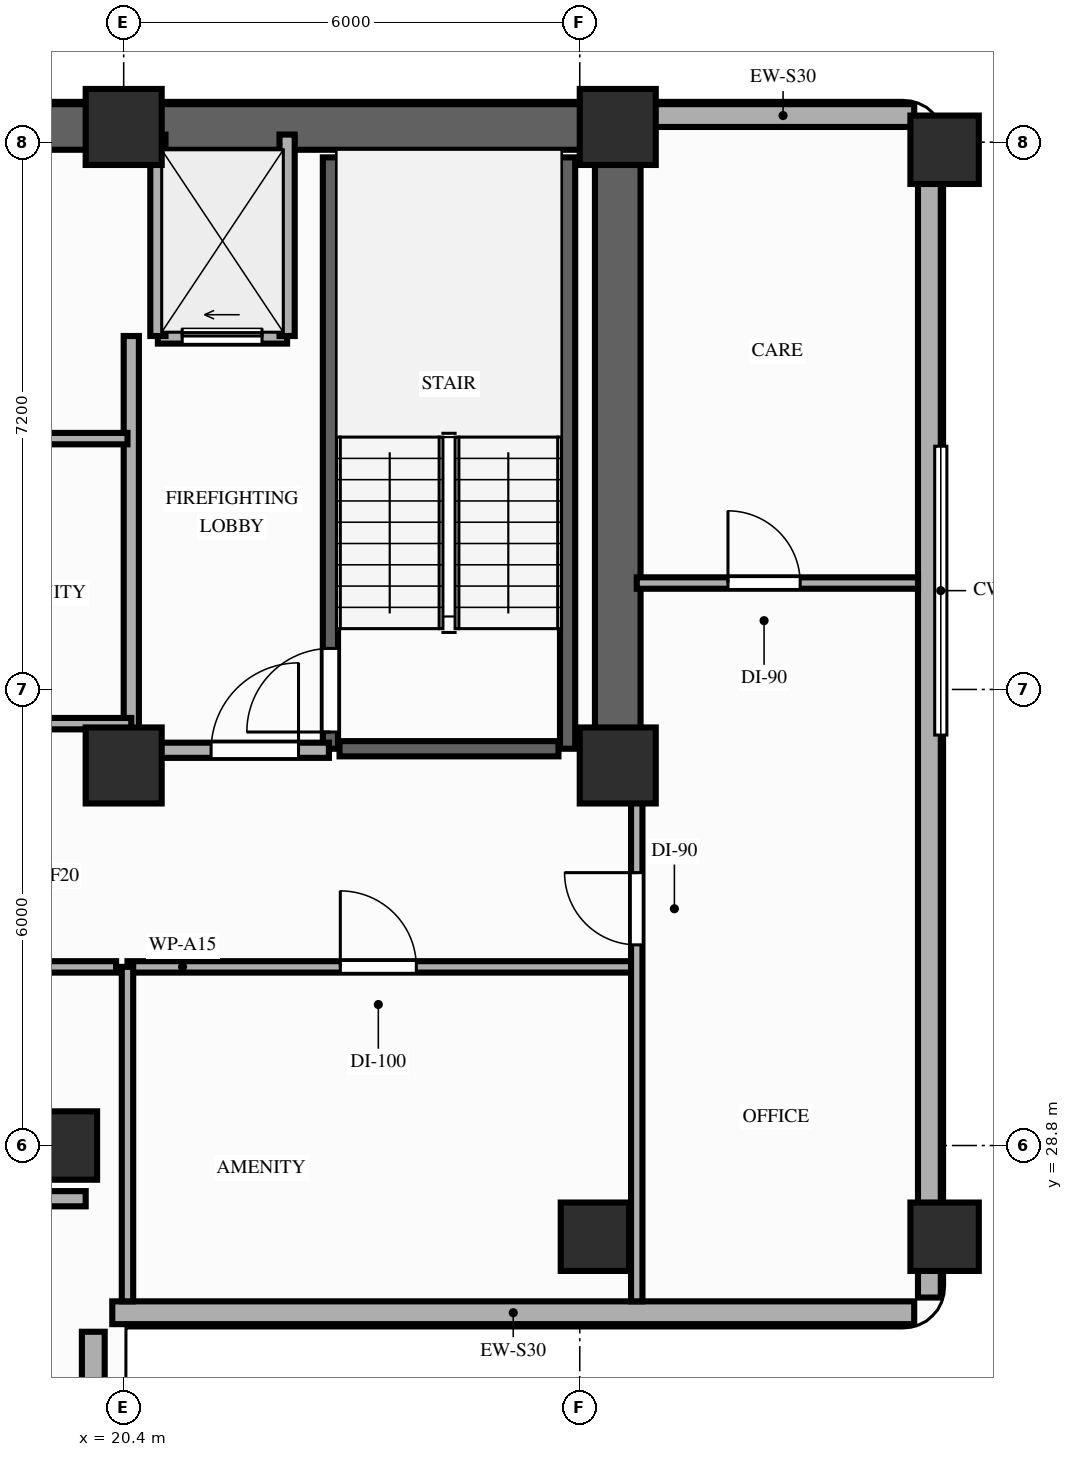
"""IFC4 building model, lengths in metres.
Left out: names, types, materials, properties, quantities, classifications, styles, units other than length and angle.
Written with IfcOpenShell. Run it as: python <this file> out.ifc"""

import sys

from ifc_helpers import new_model, si_unit, direction, frame, frame_2d, origin, origin_2d, place, context, subcontext, project, spatial, rectangle, extrude, element, fill, save


model = new_model("IFC4")
c1 = context("Model", 3, precision=1e-05, world=origin(), true_north=direction((0.0, 1.0)))
c2 = subcontext(c1, "Body", "Model", "MODEL_VIEW")
j1 = project(units=[si_unit("LENGTHUNIT", "METRE"), si_unit("PLANEANGLEUNIT", "RADIAN")], contexts=[c1])
p1 = place(None, origin())
s1 = spatial("IfcSite", under=j1, at=p1, CompositionType="ELEMENT")
p2 = place(p1, origin())
s2 = spatial("IfcBuilding", under=s1, at=p2, CompositionType="ELEMENT")
p3 = place(p2, frame((0.0, 0.0, 163.2)))
s3 = spatial("IfcBuildingStorey", under=s2, at=p3, CompositionType="ELEMENT", Elevation=163.2)
for number, where, z_axis, x_axis in (
    (1, (20.4, 33.8, 0.0), (0.0, 0.0, 1.0), (1.0, 0.0, 0.0)),
    (2, (26.9, 33.8, 0.0), (0.0, 0.0, 1.0), (1.0, 0.0, 0.0)),
    (3, (20.4, 42.2, 0.0), (0.0, 0.0, 1.0), (1.0, 0.0, 0.0)),
    (4, (26.9, 42.2, 0.0), (0.0, 0.0, 1.0), (1.0, 0.0, 0.0)),
):
    element("IfcColumn", number, at=place(p3, frame(where, z_axis=z_axis, x_axis=x_axis)), inside=s3, PredefinedType="COLUMN", context=c2, shape_type="SweptSolid", body=[
        extrude(rectangle(XDim=1.0, YDim=1.0, at=origin_2d()), origin(), (0.0, 0.0, 1.0), 3.2),
    ])
for number, where, z_axis, x_axis in (
    (5, (19.6, 28.8, 0.0), (0.0, 0.0, 1.0), (1.0, 0.0, 0.0)),
    (6, (26.6, 27.6, 0.0), (0.0, 0.0, 1.0), (1.0, 0.0, 0.0)),
    (7, (31.2, 27.6, 0.0), (0.0, 0.0, 1.0), (1.0, 0.0, 0.0)),
    (8, (31.2, 41.9, 0.0), (0.0, 0.0, 1.0), (1.0, 0.0, 0.0)),
):
    element("IfcColumn", number, at=place(p3, frame(where, z_axis=z_axis, x_axis=x_axis)), inside=s3, PredefinedType="COLUMN", context=c2, shape_type="SweptSolid", body=[
        extrude(rectangle(XDim=0.9, YDim=0.9, at=origin_2d()), origin(), (0.0, 0.0, 1.0), 3.2),
    ])
p4 = place(p3, frame((20.0, 8.8, 0.0), z_axis=(0.0, 0.0, 1.0), x_axis=(0.0, 1.0, 0.0)))
e9 = element("IfcWall", 9, at=p4, inside=s3, PredefinedType="STANDARD", context=c2, shape_type="SweptSolid", body=[
    extrude(rectangle(XDim=17.55, YDim=0.3, at=frame_2d((8.775, 0.0))), origin(), (0.0, 0.0, 1.0), 2.45),
])
p5 = place(p4, frame((1.84, 0.0, 0.85)))
e10 = element("IfcOpeningElement", 10, at=p5, cuts=e9, PredefinedType="OPENING", context=c2, shape_type="SweptSolid", body=[
    extrude(rectangle(XDim=1.1, YDim=1.35, at=frame_2d((0.55, 0.675))), frame((0.0, 0.16, 0.0), z_axis=(0.0, -1.0, 0.0), x_axis=(1.0, 0.0, 0.0)), (0.0, 0.0, 1.0), 0.32),
])
p6 = place(p4, frame((10.85, 0.0, 0.85)))
e11 = element("IfcOpeningElement", 11, at=p6, cuts=e9, PredefinedType="OPENING", context=c2, shape_type="SweptSolid", body=[
    extrude(rectangle(XDim=2.1, YDim=1.35, at=frame_2d((1.05, 0.675))), frame((0.0, 0.16, 0.0), z_axis=(0.0, -1.0, 0.0), x_axis=(1.0, 0.0, 0.0)), (0.0, 0.0, 1.0), 0.32),
])
p7 = place(p3, frame((30.8, 42.35, 0.0), z_axis=(0.0, 0.0, 1.0), x_axis=(-1.0, 0.0, 0.0)))
e12 = element("IfcWall", 12, at=p7, inside=s3, PredefinedType="STANDARD", context=c2, shape_type="SweptSolid", body=[
    extrude(rectangle(XDim=3.45, YDim=0.3, at=frame_2d((1.725, 0.0))), origin(), (0.0, 0.0, 1.0), 2.45),
])
p8 = place(p3, frame((20.25, 26.6, 0.0), z_axis=(0.0, 0.0, 1.0), x_axis=(1.0, 0.0, 0.0)))
e13 = element("IfcWall", 13, at=p8, inside=s3, PredefinedType="STANDARD", context=c2, shape_type="SweptSolid", body=[
    extrude(rectangle(XDim=10.55, YDim=0.3, at=frame_2d((5.275, 0.0))), origin(), (0.0, 0.0, 1.0), 3.02),
])
p9 = place(p3, frame((31.0, 26.8, 0.0), z_axis=(0.0, 0.0, 1.0), x_axis=(0.0, 1.0, 0.0)))
e14 = element("IfcWall", 14, at=p9, inside=s3, PredefinedType="STANDARD", context=c2, shape_type="SweptSolid", body=[
    extrude(rectangle(XDim=15.35, YDim=0.3, at=frame_2d((7.675, 0.0))), origin(), (0.0, 0.0, 1.0), 2.45),
])
p10 = place(p3, frame((6.45, 42.2, 0.0), z_axis=(0.0, 0.0, 1.0), x_axis=(1.0, 0.0, 0.0)))
e15 = element("IfcWall", 15, at=p10, inside=s3, PredefinedType="SHEAR", context=c2, shape_type="SweptSolid", body=[
    extrude(rectangle(XDim=20.45, YDim=0.6, at=frame_2d((10.225, 0.0))), origin(), (0.0, 0.0, 1.0), 3.02),
])
p11 = place(p3, frame((26.9, 33.8, 0.0), z_axis=(0.0, 0.0, 1.0), x_axis=(0.0, 1.0, 0.0)))
e16 = element("IfcWall", 16, at=p11, inside=s3, PredefinedType="SHEAR", context=c2, shape_type="SweptSolid", body=[
    extrude(rectangle(XDim=7.95, YDim=0.6, at=frame_2d((3.975, 0.0))), origin(), (0.0, 0.0, 1.0), 3.02),
])
p12 = place(p3, frame((23.12, 34.02, 0.0), z_axis=(0.0, 0.0, 1.0), x_axis=(0.0, 1.0, 0.0)))
e17 = element("IfcWall", 17, at=p12, inside=s3, PredefinedType="SHEAR", context=c2, shape_type="SweptSolid", body=[
    extrude(rectangle(XDim=7.78, YDim=0.2, at=frame_2d((3.89, 0.0))), origin(), (0.0, 0.0, 1.0), 3.02),
])
p13 = place(p12, frame((0.22, 0.0, 0.0)))
e18 = element("IfcOpeningElement", 18, at=p13, cuts=e17, PredefinedType="OPENING", context=c2, shape_type="SweptSolid", body=[
    extrude(rectangle(XDim=1.1, YDim=2.15, at=frame_2d((0.55, 1.075))), frame((0.0, 0.11, 0.0), z_axis=(0.0, -1.0, 0.0), x_axis=(1.0, 0.0, 0.0)), (0.0, 0.0, 1.0), 0.22),
])
p14 = place(p3, frame((26.24, 34.02, 0.0), z_axis=(0.0, 0.0, 1.0), x_axis=(0.0, 1.0, 0.0)))
e19 = element("IfcWall", 19, at=p14, inside=s3, PredefinedType="SHEAR", context=c2, shape_type="SweptSolid", body=[
    extrude(rectangle(XDim=7.78, YDim=0.2, at=frame_2d((3.89, 0.0))), origin(), (0.0, 0.0, 1.0), 3.02),
])
p15 = place(p3, frame((23.24, 34.02, 0.0), z_axis=(0.0, 0.0, 1.0), x_axis=(1.0, 0.0, 0.0)))
e20 = element("IfcWall", 20, at=p15, inside=s3, PredefinedType="SHEAR", context=c2, shape_type="SweptSolid", body=[
    extrude(rectangle(XDim=2.88, YDim=0.2, at=frame_2d((1.44, 0.0))), origin(), (0.0, 0.0, 1.0), 3.02),
])
p16 = place(p3, frame((20.85, 39.45, 0.0), z_axis=(0.0, 0.0, 1.0), x_axis=(1.0, 0.0, 0.0)))
e21 = element("IfcWall", 21, at=p16, inside=s3, PredefinedType="MOVABLE", context=c2, shape_type="SweptSolid", body=[
    extrude(rectangle(XDim=1.7, YDim=0.2, at=frame_2d((0.85, 0.0))), origin(), (0.0, 0.0, 1.0), 3.02),
])
p17 = place(p16, frame((0.32, 0.0, 0.0)))
e22 = element("IfcOpeningElement", 22, at=p17, cuts=e21, PredefinedType="OPENING", context=c2, shape_type="SweptSolid", body=[
    extrude(rectangle(XDim=1.05, YDim=2.15, at=frame_2d((0.525, 1.075))), frame((0.0, 0.11, 0.0), z_axis=(0.0, -1.0, 0.0), x_axis=(1.0, 0.0, 0.0)), (0.0, 0.0, 1.0), 0.22),
])
for number, where, z_axis, x_axis in (
    (23, (20.85, 39.45, 0.0), (0.0, 0.0, 1.0), (0.0, 1.0, 0.0)),
    (24, (22.55, 39.45, 0.0), (0.0, 0.0, 1.0), (0.0, 1.0, 0.0)),
):
    element("IfcWall", number, at=place(p3, frame(where, z_axis=z_axis, x_axis=x_axis)), inside=s3, PredefinedType="MOVABLE", context=c2, shape_type="SweptSolid", body=[
        extrude(rectangle(XDim=2.65, YDim=0.2, at=frame_2d((1.325, 0.0))), origin(), (0.0, 0.0, 1.0), 2.45),
    ])
p18 = place(p3, frame((20.5, 34.0, 0.0), z_axis=(0.0, 0.0, 1.0), x_axis=(0.0, 1.0, 0.0)))
e25 = element("IfcWall", 25, at=p18, inside=s3, PredefinedType="PARTITIONING", context=c2, shape_type="SweptSolid", body=[
    extrude(rectangle(XDim=5.45, YDim=0.2, at=frame_2d((2.725, 0.0))), origin(), (0.0, 0.0, 1.0), 2.45),
])
p19 = place(p3, frame((20.5, 34.0, 0.0), z_axis=(0.0, 0.0, 1.0), x_axis=(1.0, 0.0, 0.0)))
e26 = element("IfcWall", 26, at=p19, inside=s3, PredefinedType="PARTITIONING", context=c2, shape_type="SweptSolid", body=[
    extrude(rectangle(XDim=2.6, YDim=0.2, at=frame_2d((1.3, 0.0))), origin(), (0.0, 0.0, 1.0), 2.45),
])
p20 = place(p19, frame((1.05, 0.0, 0.0)))
e27 = element("IfcOpeningElement", 27, at=p20, cuts=e26, PredefinedType="OPENING", context=c2, shape_type="SweptSolid", body=[
    extrude(rectangle(XDim=1.15, YDim=2.15, at=frame_2d((0.575, 1.075))), frame((0.0, 0.11, 0.0), z_axis=(0.0, -1.0, 0.0), x_axis=(1.0, 0.0, 0.0)), (0.0, 0.0, 1.0), 0.22),
])
p21 = place(p3, frame((12.9, 34.35, 0.0), z_axis=(0.0, 0.0, 1.0), x_axis=(1.0, 0.0, 0.0)))
e28 = element("IfcWall", 28, at=p21, inside=s3, PredefinedType="PARTITIONING", context=c2, shape_type="SweptSolid", body=[
    extrude(rectangle(XDim=7.6, YDim=0.15, at=frame_2d((3.8, 0.0))), origin(), (0.0, 0.0, 1.0), 3.02),
])
p22 = place(p21, frame((2.05, 0.0, 0.0)))
e29 = element("IfcOpeningElement", 29, at=p22, cuts=e28, PredefinedType="OPENING", context=c2, shape_type="SweptSolid", body=[
    extrude(rectangle(XDim=0.85, YDim=2.05, at=frame_2d((0.425, 1.025))), frame((0.0, 0.085, 0.0), z_axis=(0.0, -1.0, 0.0), x_axis=(1.0, 0.0, 0.0)), (0.0, 0.0, 1.0), 0.17),
])
p23 = place(p21, frame((4.2, 0.0, 0.0)))
e30 = element("IfcOpeningElement", 30, at=p23, cuts=e28, PredefinedType="OPENING", context=c2, shape_type="SweptSolid", body=[
    extrude(rectangle(XDim=0.95, YDim=2.15, at=frame_2d((0.475, 1.075))), frame((0.0, 0.085, 0.0), z_axis=(0.0, -1.0, 0.0), x_axis=(1.0, 0.0, 0.0)), (0.0, 0.0, 1.0), 0.17),
])
p24 = place(p3, frame((16.4, 38.1, 0.0), z_axis=(0.0, 0.0, 1.0), x_axis=(1.0, 0.0, 0.0)))
e31 = element("IfcWall", 31, at=p24, inside=s3, PredefinedType="PARTITIONING", context=c2, shape_type="SweptSolid", body=[
    extrude(rectangle(XDim=4.05, YDim=0.15, at=frame_2d((2.025, 0.0))), origin(), (0.0, 0.0, 1.0), 3.02),
])
p25 = place(p24, frame((1.6, 0.0, 0.0)))
e32 = element("IfcOpeningElement", 32, at=p25, cuts=e31, PredefinedType="OPENING", context=c2, shape_type="SweptSolid", body=[
    extrude(rectangle(XDim=0.85, YDim=2.05, at=frame_2d((0.425, 1.025))), frame((0.0, 0.085, 0.0), z_axis=(0.0, -1.0, 0.0), x_axis=(1.0, 0.0, 0.0)), (0.0, 0.0, 1.0), 0.17),
])
p26 = place(p3, frame((14.58, 28.1, 0.0), z_axis=(0.0, 0.0, 1.0), x_axis=(1.0, 0.0, 0.0)))
e33 = element("IfcWall", 33, at=p26, inside=s3, PredefinedType="PARTITIONING", context=c2, shape_type="SweptSolid", body=[
    extrude(rectangle(XDim=5.32, YDim=0.2, at=frame_2d((2.66, 0.0))), origin(), (0.0, 0.0, 1.0), 2.45),
])
p27 = place(p3, frame((15.2, 31.15, 0.0), z_axis=(0.0, 0.0, 1.0), x_axis=(1.0, 0.0, 0.0)))
e34 = element("IfcWall", 34, at=p27, inside=s3, PredefinedType="PARTITIONING", context=c2, shape_type="SweptSolid", body=[
    extrude(rectangle(XDim=5.1, YDim=0.15, at=frame_2d((2.55, 0.0))), origin(), (0.0, 0.0, 1.0), 2.45),
])
p28 = place(p27, frame((1.6, 0.0, 0.0)))
e35 = element("IfcOpeningElement", 35, at=p28, cuts=e34, PredefinedType="OPENING", context=c2, shape_type="SweptSolid", body=[
    extrude(rectangle(XDim=1.0, YDim=2.15, at=frame_2d((0.5, 1.075))), frame((0.0, 0.085, 0.0), z_axis=(0.0, -1.0, 0.0), x_axis=(1.0, 0.0, 0.0)), (0.0, 0.0, 1.0), 0.17),
])
p29 = place(p3, frame((20.45, 31.15, 0.0), z_axis=(0.0, 0.0, 1.0), x_axis=(1.0, 0.0, 0.0)))
e36 = element("IfcWall", 36, at=p29, inside=s3, PredefinedType="PARTITIONING", context=c2, shape_type="SweptSolid", body=[
    extrude(rectangle(XDim=6.7, YDim=0.15, at=frame_2d((3.35, 0.0))), origin(), (0.0, 0.0, 1.0), 3.02),
])
p30 = place(p29, frame((2.8, 0.0, 0.0)))
e37 = element("IfcOpeningElement", 37, at=p30, cuts=e36, PredefinedType="OPENING", context=c2, shape_type="SweptSolid", body=[
    extrude(rectangle(XDim=1.0, YDim=2.15, at=frame_2d((0.5, 1.075))), frame((0.0, 0.085, 0.0), z_axis=(0.0, -1.0, 0.0), x_axis=(1.0, 0.0, 0.0)), (0.0, 0.0, 1.0), 0.17),
])
p31 = place(p3, frame((20.45, 26.75, 0.0), z_axis=(0.0, 0.0, 1.0), x_axis=(0.0, 1.0, 0.0)))
e38 = element("IfcWall", 38, at=p31, inside=s3, PredefinedType="PARTITIONING", context=c2, shape_type="SweptSolid", body=[
    extrude(rectangle(XDim=4.4, YDim=0.15, at=frame_2d((2.2, 0.0))), origin(), (0.0, 0.0, 1.0), 2.45),
])
p32 = place(p3, frame((27.15, 26.75, 0.0), z_axis=(0.0, 0.0, 1.0), x_axis=(0.0, 1.0, 0.0)))
e39 = element("IfcWall", 39, at=p32, inside=s3, PredefinedType="PARTITIONING", context=c2, shape_type="SweptSolid", body=[
    extrude(rectangle(XDim=6.93, YDim=0.15, at=frame_2d((3.465, 0.0))), origin(), (0.0, 0.0, 1.0), 2.45),
])
p33 = place(p32, frame((4.69, 0.0, 0.0)))
e40 = element("IfcOpeningElement", 40, at=p33, cuts=e39, PredefinedType="OPENING", context=c2, shape_type="SweptSolid", body=[
    extrude(rectangle(XDim=0.95, YDim=2.15, at=frame_2d((0.475, 1.075))), frame((0.0, 0.085, 0.0), z_axis=(0.0, -1.0, 0.0), x_axis=(1.0, 0.0, 0.0)), (0.0, 0.0, 1.0), 0.17),
])
p34 = place(p3, frame((27.15, 36.2, 0.0), z_axis=(0.0, 0.0, 1.0), x_axis=(1.0, 0.0, 0.0)))
e41 = element("IfcWall", 41, at=p34, inside=s3, PredefinedType="PARTITIONING", context=c2, shape_type="SweptSolid", body=[
    extrude(rectangle(XDim=3.7, YDim=0.15, at=frame_2d((1.85, 0.0))), origin(), (0.0, 0.0, 1.0), 2.45),
])
p35 = place(p34, frame((1.2, 0.0, 0.0)))
e42 = element("IfcOpeningElement", 42, at=p35, cuts=e41, PredefinedType="OPENING", context=c2, shape_type="SweptSolid", body=[
    extrude(rectangle(XDim=0.95, YDim=2.15, at=frame_2d((0.475, 1.075))), frame((0.0, 0.085, 0.0), z_axis=(0.0, -1.0, 0.0), x_axis=(1.0, 0.0, 0.0)), (0.0, 0.0, 1.0), 0.17),
])
p36 = place(p13, origin())
e43 = element("IfcDoor", 43, at=p36, inside=s3, OperationType="SINGLE_SWING_LEFT", PredefinedType="DOOR", context=c2, shape_type="SweptSolid", body=[
    extrude(rectangle(XDim=1.1, YDim=2.15, at=frame_2d((0.55, 1.075))), frame((0.0, 0.025, 0.0), z_axis=(0.0, -1.0, 0.0), x_axis=(1.0, 0.0, 0.0)), (0.0, 0.0, 1.0), 0.05),
])
fill(e18, e43)
p37 = place(p17, origin())
e44 = element("IfcDoor", 44, at=p37, inside=s3, OperationType="SLIDING_TO_LEFT", PredefinedType="DOOR", context=c2, shape_type="SweptSolid", body=[
    extrude(rectangle(XDim=1.05, YDim=2.15, at=frame_2d((0.525, 1.075))), frame((0.0, 0.025, 0.0), z_axis=(0.0, -1.0, 0.0), x_axis=(1.0, 0.0, 0.0)), (0.0, 0.0, 1.0), 0.05),
])
fill(e22, e44)
p38 = place(p20, origin())
e45 = element("IfcDoor", 45, at=p38, inside=s3, OperationType="SINGLE_SWING_RIGHT", PredefinedType="DOOR", context=c2, shape_type="SweptSolid", body=[
    extrude(rectangle(XDim=1.15, YDim=2.15, at=frame_2d((0.575, 1.075))), frame((0.0, 0.025, 0.0), z_axis=(0.0, -1.0, 0.0), x_axis=(1.0, 0.0, 0.0)), (0.0, 0.0, 1.0), 0.05),
])
fill(e27, e45)
p39 = place(p30, origin())
e46 = element("IfcDoor", 46, at=p39, inside=s3, OperationType="SINGLE_SWING_LEFT", PredefinedType="DOOR", context=c2, shape_type="SweptSolid", body=[
    extrude(rectangle(XDim=1.0, YDim=2.15, at=frame_2d((0.5, 1.075))), frame((0.0, 0.025, 0.0), z_axis=(0.0, -1.0, 0.0), x_axis=(1.0, 0.0, 0.0)), (0.0, 0.0, 1.0), 0.05),
])
fill(e37, e46)
p40 = place(p33, origin())
e47 = element("IfcDoor", 47, at=p40, inside=s3, OperationType="SINGLE_SWING_RIGHT", PredefinedType="DOOR", context=c2, shape_type="SweptSolid", body=[
    extrude(rectangle(XDim=0.95, YDim=2.15, at=frame_2d((0.475, 1.075))), frame((0.0, 0.025, 0.0), z_axis=(0.0, -1.0, 0.0), x_axis=(1.0, 0.0, 0.0)), (0.0, 0.0, 1.0), 0.05),
])
fill(e40, e47)
p41 = place(p35, origin())
e48 = element("IfcDoor", 48, at=p41, inside=s3, OperationType="SINGLE_SWING_LEFT", PredefinedType="DOOR", context=c2, shape_type="SweptSolid", body=[
    extrude(rectangle(XDim=0.95, YDim=2.15, at=frame_2d((0.475, 1.075))), frame((0.0, 0.025, 0.0), z_axis=(0.0, -1.0, 0.0), x_axis=(1.0, 0.0, 0.0)), (0.0, 0.0, 1.0), 0.05),
])
fill(e42, e48)
save(model, sys.argv[1])
